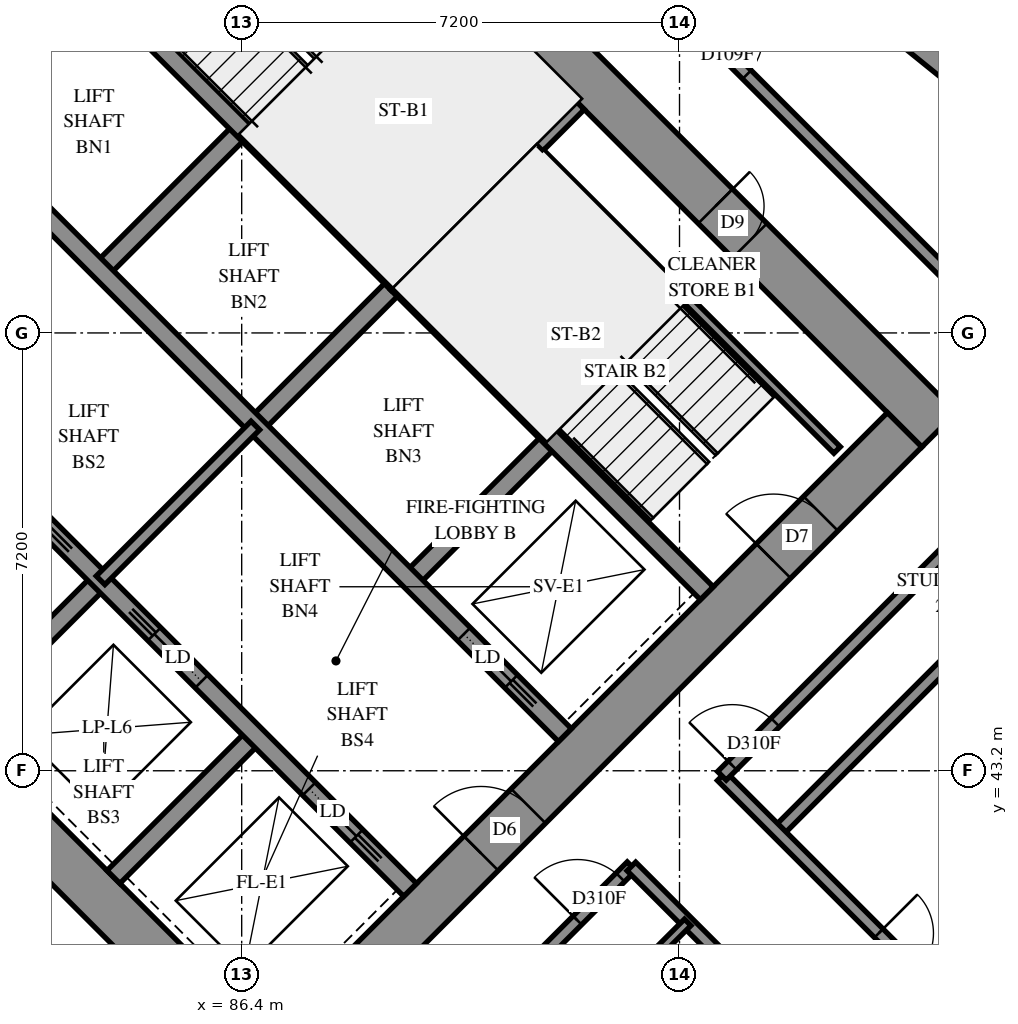
"""IFC4 building model, lengths in metres.
Left out: names, types, materials, properties, quantities, classifications, styles, units other than length and angle.
Written with IfcOpenShell. Run it as: python <this file> out.ifc"""

import sys

from ifc_helpers import new_model, si_unit, direction, frame, frame_2d, origin, place, context, subcontext, project, spatial, polyline, rectangle, outline, extrude, element, fill, save


model = new_model("IFC4")
c1 = context("Model", 3, precision=1e-05, world=origin(), true_north=direction((0.0, 1.0)))
c2 = subcontext(c1, "Body", "Model", "MODEL_VIEW")
j1 = project(units=[si_unit("LENGTHUNIT", "METRE"), si_unit("PLANEANGLEUNIT", "RADIAN")], contexts=[c1])
p1 = place(None, origin())
s1 = spatial("IfcSite", under=j1, at=p1, CompositionType="ELEMENT")
p2 = place(p1, origin())
s2 = spatial("IfcBuilding", under=s1, at=p2, CompositionType="ELEMENT")
p3 = place(p2, frame((0.0, 0.0, 88.0)))
s3 = spatial("IfcBuildingStorey", under=s2, at=p3, CompositionType="ELEMENT", Elevation=88.0)
p4 = place(p3, frame((75.806, 49.373, -0.3), z_axis=(0.0, 0.0, 1.0), x_axis=(0.7071067812, -0.7071067812, 0.0)))
e1 = element("IfcWall", 1, at=p4, inside=s3, PredefinedType="SHEAR", context=c2, shape_type="SweptSolid", body=[
    extrude(rectangle(XDim=16.0, YDim=0.8, at=frame_2d((8.0, 0.0))), origin(), (0.0, 0.0, 1.0), 2.7),
])
p5 = place(p3, frame((86.554, 60.121, -0.3), z_axis=(0.0, 0.0, 1.0), x_axis=(0.7071067812, -0.7071067812, 0.0)))
e2 = element("IfcWall", 2, at=p5, inside=s3, PredefinedType="SHEAR", context=c2, shape_type="SweptSolid", body=[
    extrude(rectangle(XDim=16.0, YDim=0.8, at=frame_2d((8.0, 0.0))), origin(), (0.0, 0.0, 1.0), 2.7),
])
p6 = place(p5, frame((10.8, 0.0, 0.3)))
e3 = element("IfcOpeningElement", 3, at=p6, cuts=e2, PredefinedType="OPENING", context=c2, shape_type="SweptSolid", body=[
    extrude(rectangle(XDim=0.8, YDim=2.1, at=frame_2d((0.4, 1.05))), frame((0.0, 0.41, 0.0), z_axis=(0.0, -1.0, 0.0), x_axis=(1.0, 0.0, 0.0)), (0.0, 0.0, 1.0), 0.82),
])
p7 = place(p3, frame((76.372, 49.373, -0.3), z_axis=(0.0, 0.0, 1.0), x_axis=(0.7071067812, 0.7071067812, 0.0)))
e4 = element("IfcWall", 4, at=p7, inside=s3, PredefinedType="SHEAR", context=c2, shape_type="SweptSolid", body=[
    extrude(rectangle(XDim=14.4, YDim=0.8, at=frame_2d((7.2, 0.0))), origin(), (0.0, 0.0, 1.0), 2.7),
])
p8 = place(p7, frame((4.55, 0.0, 0.3)))
e5 = element("IfcOpeningElement", 5, at=p8, cuts=e4, PredefinedType="OPENING", context=c2, shape_type="SweptSolid", body=[
    extrude(rectangle(XDim=1.1, YDim=2.1, at=frame_2d((0.55, 1.05))), frame((0.0, 0.41, 0.0), z_axis=(0.0, -1.0, 0.0), x_axis=(1.0, 0.0, 0.0)), (0.0, 0.0, 1.0), 0.82),
])
p9 = place(p7, frame((11.35, 0.0, 0.3)))
e6 = element("IfcOpeningElement", 6, at=p9, cuts=e4, PredefinedType="OPENING", context=c2, shape_type="SweptSolid", body=[
    extrude(rectangle(XDim=1.1, YDim=2.1, at=frame_2d((0.55, 1.05))), frame((0.0, 0.41, 0.0), z_axis=(0.0, -1.0, 0.0), x_axis=(1.0, 0.0, 0.0)), (0.0, 0.0, 1.0), 0.82),
])
p10 = place(p3, frame((87.12, 38.625, -0.3), z_axis=(0.0, 0.0, 1.0), x_axis=(0.7071067812, 0.7071067812, 0.0)))
e7 = element("IfcWall", 7, at=p10, inside=s3, PredefinedType="SHEAR", context=c2, shape_type="SweptSolid", body=[
    extrude(rectangle(XDim=14.4, YDim=0.8, at=frame_2d((7.2, 0.0))), origin(), (0.0, 0.0, 1.0), 2.7),
])
p11 = place(p10, frame((4.55, 0.0, 0.3)))
e8 = element("IfcOpeningElement", 8, at=p11, cuts=e7, PredefinedType="OPENING", context=c2, shape_type="SweptSolid", body=[
    extrude(rectangle(XDim=1.1, YDim=2.1, at=frame_2d((0.55, 1.05))), frame((0.0, 0.41, 0.0), z_axis=(0.0, -1.0, 0.0), x_axis=(1.0, 0.0, 0.0)), (0.0, 0.0, 1.0), 0.82),
])
p12 = place(p10, frame((11.35, 0.0, 0.3)))
e9 = element("IfcOpeningElement", 9, at=p12, cuts=e7, PredefinedType="OPENING", context=c2, shape_type="SweptSolid", body=[
    extrude(rectangle(XDim=1.1, YDim=2.1, at=frame_2d((0.55, 1.05))), frame((0.0, 0.41, 0.0), z_axis=(0.0, -1.0, 0.0), x_axis=(1.0, 0.0, 0.0)), (0.0, 0.0, 1.0), 0.82),
])
p13 = place(p3, frame((84.079, 51.423, 0.0), z_axis=(0.0, 0.0, 1.0), x_axis=(0.7071219326, 0.7070916295, 0.0)))
e10 = element("IfcWall", 10, at=p13, inside=s3, PredefinedType="SOLIDWALL", context=c2, shape_type="SweptSolid", body=[
    extrude(rectangle(XDim=3.3, YDim=0.3, at=frame_2d((1.65, 0.0))), origin(), (0.0, 0.0, 1.0), 3.1),
])
p14 = place(p3, frame((81.746, 43.999, 0.0), z_axis=(0.0, 0.0, 1.0), x_axis=(0.7071067812, 0.7071067812, 0.0)))
e11 = element("IfcWall", 11, at=p14, inside=s3, PredefinedType="SOLIDWALL", context=c2, shape_type="SweptSolid", body=[
    extrude(rectangle(XDim=3.3, YDim=0.3, at=frame_2d((1.65, 0.0))), origin(), (0.0, 0.0, 1.0), 3.1),
])
p15 = place(p3, frame((86.625, 48.878, 0.0), z_axis=(0.0, 0.0, 1.0), x_axis=(0.7071067812, 0.7071067812, 0.0)))
e12 = element("IfcWall", 12, at=p15, inside=s3, PredefinedType="SOLIDWALL", context=c2, shape_type="SweptSolid", body=[
    extrude(rectangle(XDim=3.3, YDim=0.3, at=frame_2d((1.65, 0.0))), origin(), (0.0, 0.0, 1.0), 3.1),
])
p16 = place(p3, frame((84.291, 41.453, 0.0), z_axis=(0.0, 0.0, 1.0), x_axis=(0.7071067812, 0.7071067812, 0.0)))
e13 = element("IfcWall", 13, at=p16, inside=s3, PredefinedType="SOLIDWALL", context=c2, shape_type="SweptSolid", body=[
    extrude(rectangle(XDim=3.3, YDim=0.3, at=frame_2d((1.65, 0.0))), origin(), (0.0, 0.0, 1.0), 3.1),
])
p17 = place(p3, frame((89.17, 46.332, 0.0), z_axis=(0.0, 0.0, 1.0), x_axis=(0.7071067812, 0.7071067812, 0.0)))
e14 = element("IfcWall", 14, at=p17, inside=s3, PredefinedType="SOLIDWALL", context=c2, shape_type="SweptSolid", body=[
    extrude(rectangle(XDim=3.3, YDim=0.3, at=frame_2d((1.65, 0.0))), origin(), (0.0, 0.0, 1.0), 3.1),
])
p18 = place(p3, frame((78.988, 51.423, 0.0), z_axis=(0.0, 0.0, 1.0), x_axis=(0.7071067812, -0.7071067812, 0.0)))
e15 = element("IfcWall", 15, at=p18, inside=s3, PredefinedType="SOLIDWALL", context=c2, shape_type="SweptSolid", body=[
    extrude(rectangle(XDim=14.4, YDim=0.3, at=frame_2d((7.2, 0.0))), origin(), (0.0, 0.0, 1.0), 3.1),
])
p19 = place(p18, frame((1.25, 0.0, 0.0)))
e16 = element("IfcOpeningElement", 16, at=p19, cuts=e15, PredefinedType="OPENING", context=c2, shape_type="SweptSolid", body=[
    extrude(rectangle(XDim=1.1, YDim=2.1, at=frame_2d((0.55, 1.05))), frame((0.0, 0.16, 0.0), z_axis=(0.0, -1.0, 0.0), x_axis=(1.0, 0.0, 0.0)), (0.0, 0.0, 1.0), 0.32),
])
p20 = place(p18, frame((4.85, 0.0, 0.0)))
e17 = element("IfcOpeningElement", 17, at=p20, cuts=e15, PredefinedType="OPENING", context=c2, shape_type="SweptSolid", body=[
    extrude(rectangle(XDim=1.1, YDim=2.1, at=frame_2d((0.55, 1.05))), frame((0.0, 0.16, 0.0), z_axis=(0.0, -1.0, 0.0), x_axis=(1.0, 0.0, 0.0)), (0.0, 0.0, 1.0), 0.32),
])
p21 = place(p18, frame((8.45, 0.0, 0.0)))
e18 = element("IfcOpeningElement", 18, at=p21, cuts=e15, PredefinedType="OPENING", context=c2, shape_type="SweptSolid", body=[
    extrude(rectangle(XDim=1.1, YDim=2.1, at=frame_2d((0.55, 1.05))), frame((0.0, 0.16, 0.0), z_axis=(0.0, -1.0, 0.0), x_axis=(1.0, 0.0, 0.0)), (0.0, 0.0, 1.0), 0.32),
])
p22 = place(p18, frame((12.05, 0.0, 0.0)))
e19 = element("IfcOpeningElement", 19, at=p22, cuts=e15, PredefinedType="OPENING", context=c2, shape_type="SweptSolid", body=[
    extrude(rectangle(XDim=1.1, YDim=2.1, at=frame_2d((0.55, 1.05))), frame((0.0, 0.16, 0.0), z_axis=(0.0, -1.0, 0.0), x_axis=(1.0, 0.0, 0.0)), (0.0, 0.0, 1.0), 0.32),
])
p23 = place(p3, frame((81.534, 53.969, 0.0), z_axis=(0.0, 0.0, 1.0), x_axis=(0.707103309, -0.7071102534, 0.0)))
e20 = element("IfcWall", 20, at=p23, inside=s3, PredefinedType="SOLIDWALL", context=c2, shape_type="SweptSolid", body=[
    extrude(rectangle(XDim=14.4, YDim=0.3, at=frame_2d((7.2, 0.0))), origin(), (0.0, 0.0, 1.0), 3.1),
])
p24 = place(p23, frame((12.05, 0.0, 0.0)))
e21 = element("IfcOpeningElement", 21, at=p24, cuts=e20, PredefinedType="OPENING", context=c2, shape_type="SweptSolid", body=[
    extrude(rectangle(XDim=1.1, YDim=2.1, at=frame_2d((0.55, 1.05))), frame((0.0, 0.16, 0.0), z_axis=(0.0, -1.0, 0.0), x_axis=(1.0, 0.0, 0.0)), (0.0, 0.0, 1.0), 0.32),
])
for number, where, z_axis, x_axis in (
    (22, (83.867, 56.302, 0.0), (0.0, 0.0, 1.0), (0.707, -0.707, 0.0)),
    (23, (88.958, 51.211, 0.0), (0.0, 0.0, 1.0), (0.707, -0.707, 0.0)),
):
    element("IfcWall", number, at=place(p3, frame(where, z_axis=z_axis, x_axis=x_axis)), inside=s3, PredefinedType="SOLIDWALL", context=c2, shape_type="SweptSolid", body=[
        extrude(rectangle(XDim=7.2, YDim=0.3, at=frame_2d((3.6, 0.0))), origin(), (0.0, 0.0, 1.0), 3.1),
    ])
p25 = place(p3, frame((88.958, 51.211, 0.0), z_axis=(0.0, 0.0, 1.0), x_axis=(0.7071067812, 0.7071067812, 0.0)))
e24 = element("IfcWall", 24, at=p25, inside=s3, PredefinedType="SOLIDWALL", context=c2, shape_type="SweptSolid", body=[
    extrude(rectangle(XDim=4.2, YDim=0.3, at=frame_2d((2.1, 0.0))), origin(), (0.0, 0.0, 1.0), 3.1),
])
p26 = place(p3, frame((98.747, 54.269, 0.0), z_axis=(0.0, 0.0, 1.0), x_axis=(-0.777677697, 0.6286631845, 0.0)))
e25 = element("IfcWall", 25, at=p26, inside=s3, PredefinedType="SOLIDWALL", context=c2, shape_type="SweptSolid", body=[
    extrude(outline(polyline([(-0.029, -0.275), (3.397, -0.275), (3.455, 0.275), (0.029, 0.275), (-0.029, -0.275)])), origin(), (0.0, 0.0, 1.0), 3.1),
])
p27 = place(p26, frame((1.596, 0.0, 0.5)))
e26 = element("IfcOpeningElement", 26, at=p27, cuts=e25, PredefinedType="OPENING", context=c2, shape_type="SweptSolid", body=[
    extrude(rectangle(XDim=1.2, YDim=2.45, at=frame_2d((0.6, 1.225))), frame((0.0, 0.285, 0.0), z_axis=(0.0, -1.0, 0.0), x_axis=(1.0, 0.0, 0.0)), (0.0, 0.0, 1.0), 0.57),
])
p28 = place(p3, frame((91.313, 53.354, 0.0), z_axis=(0.0, 0.0, 1.0), x_axis=(0.7071140275, -0.7070995348, 0.0)))
e27 = element("IfcWall", 27, at=p28, inside=s3, PredefinedType="PARTITIONING", context=c2, shape_type="SweptSolid", body=[
    extrude(rectangle(XDim=6.9, YDim=0.15, at=frame_2d((3.45, 0.0))), origin(), (0.0, 0.0, 1.0), 3.1),
])
p29 = place(p3, frame((84.079, 46.332, 0.0), z_axis=(0.0, 0.0, 1.0), x_axis=(0.7071067812, 0.7071067812, 0.0)))
e28 = element("IfcWall", 28, at=p29, inside=s3, PredefinedType="PARTITIONING", context=c2, shape_type="SweptSolid", body=[
    extrude(rectangle(XDim=3.6, YDim=0.2, at=frame_2d((1.8, 0.0))), origin(), (0.0, 0.0, 1.0), 3.1),
])
p30 = place(p3, frame((87.894, 61.461, 0.0), z_axis=(0.0, 0.0, 1.0), x_axis=(0.7071067812, -0.7071067812, 0.0)))
e29 = element("IfcWall", 29, at=p30, inside=s3, PredefinedType="PARTITIONING", context=c2, shape_type="SweptSolid", body=[
    extrude(rectangle(XDim=17.5, YDim=0.2, at=frame_2d((8.75, 0.0))), origin(), (0.0, 0.0, 1.0), 3.1),
])
p31 = place(p30, frame((8.735, 0.0, 0.0)))
e30 = element("IfcOpeningElement", 30, at=p31, cuts=e29, PredefinedType="OPENING", context=c2, shape_type="SweptSolid", body=[
    extrude(rectangle(XDim=0.9, YDim=2.1, at=frame_2d((0.45, 1.05))), frame((0.0, 0.11, 0.0), z_axis=(0.0, -1.0, 0.0), x_axis=(1.0, 0.0, 0.0)), (0.0, 0.0, 1.0), 0.22),
])
p32 = place(p3, frame((95.215, 42.197, 0.0), z_axis=(0.0, 0.0, 1.0), x_axis=(0.7071067812, 0.7071067812, 0.0)))
e31 = element("IfcWall", 31, at=p32, inside=s3, PredefinedType="PARTITIONING", context=c2, shape_type="SweptSolid", body=[
    extrude(rectangle(XDim=10.675, YDim=0.2, at=frame_2d((5.338, 0.0))), origin(), (0.0, 0.0, 1.0), 3.1),
])
p33 = place(p3, frame((94.294, 43.111, 0.0), z_axis=(0.0, 0.0, 1.0), x_axis=(0.7071067812, -0.7071067812, 0.0)))
e32 = element("IfcWall", 32, at=p33, inside=s3, PredefinedType="PARTITIONING", context=c2, shape_type="SweptSolid", body=[
    extrude(rectangle(XDim=8.499, YDim=0.2, at=frame_2d((4.25, 0.0))), origin(), (0.0, 0.0, 1.0), 3.1),
])
p34 = place(p33, frame((3.651, 0.0, 0.0)))
e33 = element("IfcOpeningElement", 33, at=p34, cuts=e32, PredefinedType="OPENING", context=c2, shape_type="SweptSolid", body=[
    extrude(rectangle(XDim=0.9, YDim=2.1, at=frame_2d((0.45, 1.05))), frame((0.0, 0.11, 0.0), z_axis=(0.0, -1.0, 0.0), x_axis=(1.0, 0.0, 0.0)), (0.0, 0.0, 1.0), 0.22),
])
p35 = place(p3, frame((86.835, 35.655, 0.0), z_axis=(0.0, 0.0, 1.0), x_axis=(0.7071067812, 0.7071067812, 0.0)))
e34 = element("IfcWall", 34, at=p35, inside=s3, PredefinedType="PARTITIONING", context=c2, shape_type="SweptSolid", body=[
    extrude(rectangle(XDim=8.451, YDim=0.2, at=frame_2d((4.226, 0.0))), origin(), (0.0, 0.0, 1.0), 3.1),
])
p36 = place(p35, frame((7.192, 0.0, 0.0)))
e35 = element("IfcOpeningElement", 35, at=p36, cuts=e34, PredefinedType="OPENING", context=c2, shape_type="SweptSolid", body=[
    extrude(rectangle(XDim=1.0, YDim=2.1, at=frame_2d((0.5, 1.05))), frame((0.0, 0.11, 0.0), z_axis=(0.0, -1.0, 0.0), x_axis=(1.0, 0.0, 0.0)), (0.0, 0.0, 1.0), 0.22),
])
p37 = place(p3, frame((94.297, 43.117, 0.0), z_axis=(0.0, 0.0, 1.0), x_axis=(0.7071067812, 0.7071067812, 0.0)))
e36 = element("IfcWall", 36, at=p37, inside=s3, PredefinedType="PARTITIONING", context=c2, shape_type="SweptSolid", body=[
    extrude(rectangle(XDim=8.448, YDim=0.2, at=frame_2d((4.224, 0.0))), origin(), (0.0, 0.0, 1.0), 3.1),
])
p38 = place(p37, frame((0.242, 0.0, 0.0)))
e37 = element("IfcOpeningElement", 37, at=p38, cuts=e36, PredefinedType="OPENING", context=c2, shape_type="SweptSolid", body=[
    extrude(rectangle(XDim=1.0, YDim=2.1, at=frame_2d((0.5, 1.05))), frame((0.0, 0.11, 0.0), z_axis=(0.0, -1.0, 0.0), x_axis=(1.0, 0.0, 0.0)), (0.0, 0.0, 1.0), 0.22),
])
p39 = place(p3, frame((80.948, 41.536, 0.0), z_axis=(0.0, 0.0, 1.0), x_axis=(0.7071067812, -0.7071067812, 0.0)))
e38 = element("IfcWall", 38, at=p39, inside=s3, PredefinedType="PARTITIONING", context=c2, shape_type="SweptSolid", body=[
    extrude(rectangle(XDim=6.822, YDim=0.2, at=frame_2d((3.411, 0.0))), origin(), (0.0, 0.0, 1.0), 3.1),
])
p40 = place(p3, frame((92.809, 41.627, 0.0), z_axis=(0.0, 0.0, 1.0), x_axis=(0.7071067812, -0.7071067812, 0.0)))
e39 = element("IfcWall", 39, at=p40, inside=s3, PredefinedType="PARTITIONING", context=c2, shape_type="SweptSolid", body=[
    extrude(rectangle(XDim=3.623, YDim=0.2, at=frame_2d((1.812, 0.0))), origin(), (0.0, 0.0, 1.0), 3.1),
])
p41 = place(p3, frame((92.037, 39.011, 0.0), z_axis=(0.0, 0.0, 1.0), x_axis=(0.7075233388, 0.706689978, 0.0)))
e40 = element("IfcWall", 40, at=p41, inside=s3, PredefinedType="PARTITIONING", context=c2, shape_type="SweptSolid", body=[
    extrude(rectangle(XDim=2.4, YDim=0.15, at=frame_2d((1.2, 0.0))), origin(), (0.0, 0.0, 1.0), 3.1),
])
p42 = place(p6, origin())
e41 = element("IfcDoor", 41, at=p42, inside=s3, OperationType="SINGLE_SWING_RIGHT", PredefinedType="DOOR", context=c2, shape_type="SweptSolid", body=[
    extrude(rectangle(XDim=0.8, YDim=2.1, at=frame_2d((0.4, 1.05))), frame((0.0, -0.34, 0.0), z_axis=(0.0, -1.0, 0.0), x_axis=(1.0, 0.0, 0.0)), (0.0, 0.0, 1.0), 0.05),
])
fill(e3, e41)
p43 = place(p11, origin())
e42 = element("IfcDoor", 42, at=p43, inside=s3, OperationType="DOUBLE_DOOR_SINGLE_SWING", PredefinedType="DOOR", context=c2, shape_type="SweptSolid", body=[
    extrude(rectangle(XDim=1.1, YDim=2.1, at=frame_2d((0.55, 1.05))), frame((0.0, 0.025, 0.0), z_axis=(0.0, -1.0, 0.0), x_axis=(1.0, 0.0, 0.0)), (0.0, 0.0, 1.0), 0.05),
])
fill(e8, e42)
p44 = place(p12, origin())
e43 = element("IfcDoor", 43, at=p44, inside=s3, OperationType="SINGLE_SWING_RIGHT", PredefinedType="DOOR", context=c2, shape_type="SweptSolid", body=[
    extrude(rectangle(XDim=1.1, YDim=2.1, at=frame_2d((0.55, 1.05))), frame((0.0, 0.025, 0.0), z_axis=(0.0, -1.0, 0.0), x_axis=(1.0, 0.0, 0.0)), (0.0, 0.0, 1.0), 0.05),
])
fill(e9, e43)
p45 = place(p21, origin())
e44 = element("IfcDoor", 44, at=p45, inside=s3, OperationType="SLIDING_TO_LEFT", PredefinedType="DOOR", context=c2, shape_type="SweptSolid", body=[
    extrude(rectangle(XDim=1.1, YDim=2.1, at=frame_2d((0.55, 1.05))), frame((0.0, 0.025, 0.0), z_axis=(0.0, -1.0, 0.0), x_axis=(1.0, 0.0, 0.0)), (0.0, 0.0, 1.0), 0.05),
])
fill(e18, e44)
p46 = place(p22, origin())
e45 = element("IfcDoor", 45, at=p46, inside=s3, OperationType="SLIDING_TO_RIGHT", PredefinedType="DOOR", context=c2, shape_type="SweptSolid", body=[
    extrude(rectangle(XDim=1.1, YDim=2.1, at=frame_2d((0.55, 1.05))), frame((0.0, 0.025, 0.0), z_axis=(0.0, -1.0, 0.0), x_axis=(1.0, 0.0, 0.0)), (0.0, 0.0, 1.0), 0.05),
])
fill(e19, e45)
p47 = place(p24, origin())
e46 = element("IfcDoor", 46, at=p47, inside=s3, OperationType="SLIDING_TO_RIGHT", PredefinedType="DOOR", context=c2, shape_type="SweptSolid", body=[
    extrude(rectangle(XDim=1.1, YDim=2.1, at=frame_2d((0.55, 1.05))), frame((0.0, 0.025, 0.0), z_axis=(0.0, -1.0, 0.0), x_axis=(1.0, 0.0, 0.0)), (0.0, 0.0, 1.0), 0.05),
])
fill(e21, e46)
p48 = place(p31, origin())
e47 = element("IfcDoor", 47, at=p48, inside=s3, OperationType="SINGLE_SWING_LEFT", PredefinedType="DOOR", context=c2, shape_type="SweptSolid", body=[
    extrude(rectangle(XDim=0.9, YDim=2.1, at=frame_2d((0.45, 1.05))), frame((0.0, 0.025, 0.0), z_axis=(0.0, -1.0, 0.0), x_axis=(1.0, 0.0, 0.0)), (0.0, 0.0, 1.0), 0.05),
])
fill(e30, e47)
p49 = place(p38, origin())
e48 = element("IfcDoor", 48, at=p49, inside=s3, OperationType="SINGLE_SWING_LEFT", PredefinedType="DOOR", context=c2, shape_type="SweptSolid", body=[
    extrude(rectangle(XDim=1.0, YDim=2.1, at=frame_2d((0.5, 1.05))), frame((0.0, 0.025, 0.0), z_axis=(0.0, -1.0, 0.0), x_axis=(1.0, 0.0, 0.0)), (0.0, 0.0, 1.0), 0.05),
])
fill(e37, e48)
p50 = place(p34, origin())
e49 = element("IfcDoor", 49, at=p50, inside=s3, OperationType="SINGLE_SWING_RIGHT", PredefinedType="DOOR", context=c2, shape_type="SweptSolid", body=[
    extrude(rectangle(XDim=0.9, YDim=2.1, at=frame_2d((0.45, 1.05))), frame((0.0, 0.025, 0.0), z_axis=(0.0, -1.0, 0.0), x_axis=(1.0, 0.0, 0.0)), (0.0, 0.0, 1.0), 0.05),
])
fill(e33, e49)
p51 = place(p36, origin())
e50 = element("IfcDoor", 50, at=p51, inside=s3, OperationType="SINGLE_SWING_RIGHT", PredefinedType="DOOR", context=c2, shape_type="SweptSolid", body=[
    extrude(rectangle(XDim=1.0, YDim=2.1, at=frame_2d((0.5, 1.05))), frame((0.0, 0.025, 0.0), z_axis=(0.0, -1.0, 0.0), x_axis=(1.0, 0.0, 0.0)), (0.0, 0.0, 1.0), 0.05),
])
fill(e35, e50)
save(model, sys.argv[1])
